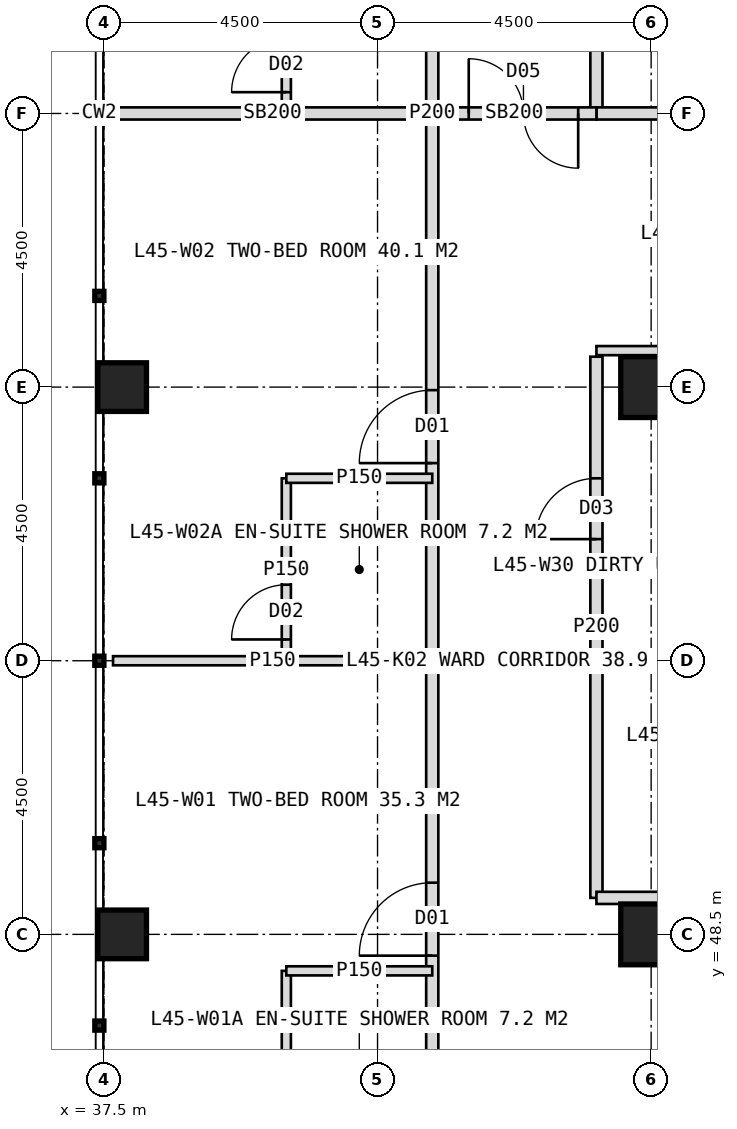
"""IFC4 building model, lengths in metres.
Left out: names, types, materials, properties, quantities, classifications, styles, units other than length and angle.
Written with IfcOpenShell. Run it as: python <this file> out.ifc"""

import sys

from ifc_helpers import new_model, si_unit, direction, frame, frame_2d, origin, origin_2d, place, context, subcontext, project, spatial, rectangle, hollow_rectangle, extrude, element, fill, save


model = new_model("IFC4")
c1 = context("Model", 3, precision=1e-05, world=origin(), true_north=direction((0.0, 1.0)))
c2 = subcontext(c1, "Body", "Model", "MODEL_VIEW")
j1 = project(units=[si_unit("LENGTHUNIT", "METRE"), si_unit("PLANEANGLEUNIT", "RADIAN")], contexts=[c1])
p1 = place(None, origin())
s1 = spatial("IfcSite", under=j1, at=p1, CompositionType="ELEMENT")
p2 = place(p1, origin())
s2 = spatial("IfcBuilding", under=s1, at=p2, CompositionType="ELEMENT")
p3 = place(p2, frame((0.0, 0.0, 189.0)))
s3 = spatial("IfcBuildingStorey", under=s2, at=p3, CompositionType="ELEMENT", Elevation=189.0)
for number, where, z_axis, x_axis in (
    (1, (46.5, 48.5, 0.0), (0.0, 0.0, 1.0), (1.0, 0.0, 0.0)),
    (2, (46.5, 57.5, 0.0), (0.0, 0.0, 1.0), (1.0, 0.0, 0.0)),
):
    element("IfcColumn", number, at=place(p3, frame(where, z_axis=z_axis, x_axis=x_axis)), inside=s3, PredefinedType="COLUMN", context=c2, shape_type="SweptSolid", body=[
        extrude(hollow_rectangle(XDim=1.0, YDim=1.0, WallThickness=0.1, at=origin_2d()), origin(), (0.0, 0.0, 1.0), 4.0),
    ])
for number, where, z_axis, x_axis in (
    (3, (37.8, 48.5, 0.0), (0.0, 0.0, 1.0), (1.0, 0.0, 0.0)),
    (4, (37.8, 57.5, 0.0), (0.0, 0.0, 1.0), (1.0, 0.0, 0.0)),
):
    element("IfcColumn", number, at=place(p3, frame(where, z_axis=z_axis, x_axis=x_axis)), inside=s3, PredefinedType="COLUMN", context=c2, shape_type="SweptSolid", body=[
        extrude(hollow_rectangle(XDim=0.8, YDim=0.8, WallThickness=0.08, at=origin_2d()), origin(), (0.0, 0.0, 1.0), 4.0),
    ])
p4 = place(p3, frame((42.9, 53.0, 0.0), z_axis=(0.0, 0.0, 1.0), x_axis=(-1.0, 0.0, 0.0)))
e5 = element("IfcWall", 5, at=p4, inside=s3, PredefinedType="PARTITIONING", context=c2, shape_type="SweptSolid", body=[
    extrude(rectangle(XDim=5.25, YDim=0.15, at=frame_2d((2.625, 0.0))), origin(), (0.0, 0.0, 1.0), 3.75),
])
p5 = place(p3, frame((42.9, 62.0, 0.0), z_axis=(0.0, 0.0, 1.0), x_axis=(-1.0, 0.0, 0.0)))
e6 = element("IfcWall", 6, at=p5, inside=s3, PredefinedType="SOLIDWALL", context=c2, shape_type="SweptSolid", body=[
    extrude(rectangle(XDim=5.25, YDim=0.2, at=frame_2d((2.625, 0.0))), origin(), (0.0, 0.0, 1.0), 2.95),
])
p6 = place(p3, frame((42.9, 44.9, 0.0), z_axis=(0.0, 0.0, 1.0), x_axis=(0.0, 1.0, 0.0)))
e7 = element("IfcWall", 7, at=p6, inside=s3, PredefinedType="PARTITIONING", context=c2, shape_type="SweptSolid", body=[
    extrude(rectangle(XDim=34.2, YDim=0.2, at=frame_2d((17.1, 0.0))), origin(), (0.0, 0.0, 1.0), 3.75),
])
p7 = place(p6, frame((3.25, 0.0, 0.0)))
e8 = element("IfcOpeningElement", 8, at=p7, cuts=e7, PredefinedType="OPENING", context=c2, shape_type="SweptSolid", body=[
    extrude(rectangle(XDim=1.2, YDim=2.2, at=frame_2d((0.6, 1.1))), frame((0.0, 0.11, 0.0), z_axis=(0.0, -1.0, 0.0), x_axis=(1.0, 0.0, 0.0)), (0.0, 0.0, 1.0), 0.22),
])
p8 = place(p6, frame((11.35, 0.0, 0.0)))
e9 = element("IfcOpeningElement", 9, at=p8, cuts=e7, PredefinedType="OPENING", context=c2, shape_type="SweptSolid", body=[
    extrude(rectangle(XDim=1.2, YDim=2.2, at=frame_2d((0.6, 1.1))), frame((0.0, 0.11, 0.0), z_axis=(0.0, -1.0, 0.0), x_axis=(1.0, 0.0, 0.0)), (0.0, 0.0, 1.0), 0.22),
])
p9 = place(p6, frame((20.35, 0.0, 0.0)))
e10 = element("IfcOpeningElement", 10, at=p9, cuts=e7, PredefinedType="OPENING", context=c2, shape_type="SweptSolid", body=[
    extrude(rectangle(XDim=1.2, YDim=2.2, at=frame_2d((0.6, 1.1))), frame((0.0, 0.11, 0.0), z_axis=(0.0, -1.0, 0.0), x_axis=(1.0, 0.0, 0.0)), (0.0, 0.0, 1.0), 0.22),
])
p10 = place(p6, frame((29.35, 0.0, 0.0)))
e11 = element("IfcOpeningElement", 11, at=p10, cuts=e7, PredefinedType="OPENING", context=c2, shape_type="SweptSolid", body=[
    extrude(rectangle(XDim=1.2, YDim=2.2, at=frame_2d((0.6, 1.1))), frame((0.0, 0.11, 0.0), z_axis=(0.0, -1.0, 0.0), x_axis=(1.0, 0.0, 0.0)), (0.0, 0.0, 1.0), 0.22),
])
p11 = place(p3, frame((40.5, 44.9, 0.0), z_axis=(0.0, 0.0, 1.0), x_axis=(0.0, 1.0, 0.0)))
e12 = element("IfcWall", 12, at=p11, inside=s3, PredefinedType="PARTITIONING", context=c2, shape_type="SweptSolid", body=[
    extrude(rectangle(XDim=3.0, YDim=0.15, at=frame_2d((1.5, 0.0))), origin(), (0.0, 0.0, 1.0), 3.75),
])
p12 = place(p11, frame((0.35, 0.0, 0.0)))
e13 = element("IfcOpeningElement", 13, at=p12, cuts=e12, PredefinedType="OPENING", context=c2, shape_type="SweptSolid", body=[
    extrude(rectangle(XDim=0.9, YDim=2.1, at=frame_2d((0.45, 1.05))), frame((0.0, 0.085, 0.0), z_axis=(0.0, -1.0, 0.0), x_axis=(1.0, 0.0, 0.0)), (0.0, 0.0, 1.0), 0.17),
])
p13 = place(p3, frame((42.9, 47.9, 0.0), z_axis=(0.0, 0.0, 1.0), x_axis=(-1.0, 0.0, 0.0)))
e14 = element("IfcWall", 14, at=p13, inside=s3, PredefinedType="PARTITIONING", context=c2, shape_type="SweptSolid", body=[
    extrude(rectangle(XDim=2.4, YDim=0.15, at=frame_2d((1.2, 0.0))), origin(), (0.0, 0.0, 1.0), 3.75),
])
p14 = place(p3, frame((40.5, 53.0, 0.0), z_axis=(0.0, 0.0, 1.0), x_axis=(0.0, 1.0, 0.0)))
e15 = element("IfcWall", 15, at=p14, inside=s3, PredefinedType="PARTITIONING", context=c2, shape_type="SweptSolid", body=[
    extrude(rectangle(XDim=3.0, YDim=0.15, at=frame_2d((1.5, 0.0))), origin(), (0.0, 0.0, 1.0), 3.75),
])
p15 = place(p14, frame((0.35, 0.0, 0.0)))
e16 = element("IfcOpeningElement", 16, at=p15, cuts=e15, PredefinedType="OPENING", context=c2, shape_type="SweptSolid", body=[
    extrude(rectangle(XDim=0.9, YDim=2.1, at=frame_2d((0.45, 1.05))), frame((0.0, 0.085, 0.0), z_axis=(0.0, -1.0, 0.0), x_axis=(1.0, 0.0, 0.0)), (0.0, 0.0, 1.0), 0.17),
])
p16 = place(p3, frame((42.9, 56.0, 0.0), z_axis=(0.0, 0.0, 1.0), x_axis=(-1.0, 0.0, 0.0)))
e17 = element("IfcWall", 17, at=p16, inside=s3, PredefinedType="PARTITIONING", context=c2, shape_type="SweptSolid", body=[
    extrude(rectangle(XDim=2.4, YDim=0.15, at=frame_2d((1.2, 0.0))), origin(), (0.0, 0.0, 1.0), 3.75),
])
p17 = place(p3, frame((40.5, 62.0, 0.0), z_axis=(0.0, 0.0, 1.0), x_axis=(0.0, 1.0, 0.0)))
e18 = element("IfcWall", 18, at=p17, inside=s3, PredefinedType="PARTITIONING", context=c2, shape_type="SweptSolid", body=[
    extrude(rectangle(XDim=3.0, YDim=0.15, at=frame_2d((1.5, 0.0))), origin(), (0.0, 0.0, 1.0), 3.75),
])
p18 = place(p17, frame((0.35, 0.0, 0.0)))
e19 = element("IfcOpeningElement", 19, at=p18, cuts=e18, PredefinedType="OPENING", context=c2, shape_type="SweptSolid", body=[
    extrude(rectangle(XDim=0.9, YDim=2.1, at=frame_2d((0.45, 1.05))), frame((0.0, 0.085, 0.0), z_axis=(0.0, -1.0, 0.0), x_axis=(1.0, 0.0, 0.0)), (0.0, 0.0, 1.0), 0.17),
])
p19 = place(p3, frame((51.0, 53.0, 0.0), z_axis=(0.0, 0.0, 1.0), x_axis=(-1.0, 0.0, 0.0)))
e20 = element("IfcWall", 20, at=p19, inside=s3, PredefinedType="PARTITIONING", context=c2, shape_type="SweptSolid", body=[
    extrude(rectangle(XDim=5.4, YDim=0.15, at=frame_2d((2.7, 0.0))), origin(), (0.0, 0.0, 1.0), 3.75),
])
p20 = place(p3, frame((45.6, 49.1, 0.0), z_axis=(0.0, 0.0, 1.0), x_axis=(0.0, 1.0, 0.0)))
e21 = element("IfcWall", 21, at=p20, inside=s3, PredefinedType="PARTITIONING", context=c2, shape_type="SweptSolid", body=[
    extrude(rectangle(XDim=8.9, YDim=0.2, at=frame_2d((4.45, 0.0))), origin(), (0.0, 0.0, 1.0), 3.75),
])
p21 = place(p20, frame((5.9, 0.0, 0.0)))
e22 = element("IfcOpeningElement", 22, at=p21, cuts=e21, PredefinedType="OPENING", context=c2, shape_type="SweptSolid", body=[
    extrude(rectangle(XDim=1.0, YDim=2.1, at=frame_2d((0.5, 1.05))), frame((0.0, 0.11, 0.0), z_axis=(0.0, -1.0, 0.0), x_axis=(1.0, 0.0, 0.0)), (0.0, 0.0, 1.0), 0.22),
])
p22 = place(p3, frame((45.6, 62.0, 0.0), z_axis=(0.0, 0.0, 1.0), x_axis=(0.0, 1.0, 0.0)))
e23 = element("IfcWall", 23, at=p22, inside=s3, PredefinedType="PARTITIONING", context=c2, shape_type="SweptSolid", body=[
    extrude(rectangle(XDim=14.4, YDim=0.2, at=frame_2d((7.2, 0.0))), origin(), (0.0, 0.0, 1.0), 3.75),
])
p23 = place(p22, frame((2.5, 0.0, 0.0)))
e24 = element("IfcOpeningElement", 24, at=p23, cuts=e23, PredefinedType="OPENING", context=c2, shape_type="SweptSolid", body=[
    extrude(rectangle(XDim=1.0, YDim=2.1, at=frame_2d((0.5, 1.05))), frame((0.0, 0.11, 0.0), z_axis=(0.0, -1.0, 0.0), x_axis=(1.0, 0.0, 0.0)), (0.0, 0.0, 1.0), 0.22),
])
p24 = place(p22, frame((7.0, 0.0, 0.0)))
e25 = element("IfcOpeningElement", 25, at=p24, cuts=e23, PredefinedType="OPENING", context=c2, shape_type="SweptSolid", body=[
    extrude(rectangle(XDim=1.0, YDim=2.1, at=frame_2d((0.5, 1.05))), frame((0.0, 0.11, 0.0), z_axis=(0.0, -1.0, 0.0), x_axis=(1.0, 0.0, 0.0)), (0.0, 0.0, 1.0), 0.22),
])
p25 = place(p22, frame((11.2, 0.0, 0.0)))
e26 = element("IfcOpeningElement", 26, at=p25, cuts=e23, PredefinedType="OPENING", context=c2, shape_type="SweptSolid", body=[
    extrude(rectangle(XDim=1.0, YDim=2.1, at=frame_2d((0.5, 1.05))), frame((0.0, 0.11, 0.0), z_axis=(0.0, -1.0, 0.0), x_axis=(1.0, 0.0, 0.0)), (0.0, 0.0, 1.0), 0.22),
])
p26 = place(p3, frame((51.0, 58.1, 0.0), z_axis=(0.0, 0.0, 1.0), x_axis=(-1.0, 0.0, 0.0)))
e27 = element("IfcWall", 27, at=p26, inside=s3, PredefinedType="PARTITIONING", context=c2, shape_type="SweptSolid", body=[
    extrude(rectangle(XDim=5.4, YDim=0.15, at=frame_2d((2.7, 0.0))), origin(), (0.0, 0.0, 1.0), 3.75),
])
p27 = place(p26, frame((0.6, 0.0, 0.0)))
e28 = element("IfcOpeningElement", 28, at=p27, cuts=e27, PredefinedType="OPENING", context=c2, shape_type="SweptSolid", body=[
    extrude(rectangle(XDim=0.9, YDim=2.1, at=frame_2d((0.45, 1.05))), frame((0.0, 0.085, 0.0), z_axis=(0.0, -1.0, 0.0), x_axis=(1.0, 0.0, 0.0)), (0.0, 0.0, 1.0), 0.17),
])
p28 = place(p3, frame((51.0, 62.0, 0.0), z_axis=(0.0, 0.0, 1.0), x_axis=(-1.0, 0.0, 0.0)))
e29 = element("IfcWall", 29, at=p28, inside=s3, PredefinedType="SOLIDWALL", context=c2, shape_type="SweptSolid", body=[
    extrude(rectangle(XDim=5.4, YDim=0.2, at=frame_2d((2.7, 0.0))), origin(), (0.0, 0.0, 1.0), 2.95),
])
p29 = place(p3, frame((57.75, 49.1, 0.0), z_axis=(0.0, 0.0, 1.0), x_axis=(-1.0, 0.0, 0.0)))
e30 = element("IfcWall", 30, at=p29, inside=s3, PredefinedType="PARTITIONING", context=c2, shape_type="SweptSolid", body=[
    extrude(rectangle(XDim=12.15, YDim=0.2, at=frame_2d((6.075, 0.0))), origin(), (0.0, 0.0, 1.0), 3.75),
])
p30 = place(p29, frame((4.3, 0.0, 0.0)))
e31 = element("IfcOpeningElement", 31, at=p30, cuts=e30, PredefinedType="OPENING", context=c2, shape_type="SweptSolid", body=[
    extrude(rectangle(XDim=1.0, YDim=2.1, at=frame_2d((0.5, 1.05))), frame((0.0, 0.11, 0.0), z_axis=(0.0, -1.0, 0.0), x_axis=(1.0, 0.0, 0.0)), (0.0, 0.0, 1.0), 0.22),
])
p31 = place(p29, frame((8.95, 0.0, 0.0)))
e32 = element("IfcOpeningElement", 32, at=p31, cuts=e30, PredefinedType="OPENING", context=c2, shape_type="SweptSolid", body=[
    extrude(rectangle(XDim=1.0, YDim=2.1, at=frame_2d((0.5, 1.05))), frame((0.0, 0.11, 0.0), z_axis=(0.0, -1.0, 0.0), x_axis=(1.0, 0.0, 0.0)), (0.0, 0.0, 1.0), 0.22),
])
p32 = place(p3, frame((45.6, 62.0, 0.0), z_axis=(0.0, 0.0, 1.0), x_axis=(-1.0, 0.0, 0.0)))
e33 = element("IfcWall", 33, at=p32, inside=s3, PredefinedType="SOLIDWALL", context=c2, shape_type="SweptSolid", body=[
    extrude(rectangle(XDim=2.7, YDim=0.2, at=frame_2d((1.35, 0.0))), origin(), (0.0, 0.0, 1.0), 2.95),
])
p33 = place(p32, frame((0.3, 0.0, 0.0)))
e34 = element("IfcOpeningElement", 34, at=p33, cuts=e33, PredefinedType="OPENING", context=c2, shape_type="SweptSolid", body=[
    extrude(rectangle(XDim=1.8, YDim=2.2, at=frame_2d((0.9, 1.1))), frame((0.0, 0.11, 0.0), z_axis=(0.0, -1.0, 0.0), x_axis=(1.0, 0.0, 0.0)), (0.0, 0.0, 1.0), 0.22),
])
p34 = place(p7, origin())
e35 = element("IfcDoor", 35, at=p34, inside=s3, OperationType="SINGLE_SWING_LEFT", PredefinedType="DOOR", context=c2, shape_type="SweptSolid", body=[
    extrude(rectangle(XDim=1.2, YDim=2.2, at=frame_2d((0.6, 1.1))), frame((0.0, 0.025, 0.0), z_axis=(0.0, -1.0, 0.0), x_axis=(1.0, 0.0, 0.0)), (0.0, 0.0, 1.0), 0.05),
])
fill(e8, e35)
p35 = place(p8, origin())
e36 = element("IfcDoor", 36, at=p35, inside=s3, OperationType="SINGLE_SWING_LEFT", PredefinedType="DOOR", context=c2, shape_type="SweptSolid", body=[
    extrude(rectangle(XDim=1.2, YDim=2.2, at=frame_2d((0.6, 1.1))), frame((0.0, 0.025, 0.0), z_axis=(0.0, -1.0, 0.0), x_axis=(1.0, 0.0, 0.0)), (0.0, 0.0, 1.0), 0.05),
])
fill(e9, e36)
p36 = place(p15, origin())
e37 = element("IfcDoor", 37, at=p36, inside=s3, OperationType="SINGLE_SWING_LEFT", PredefinedType="DOOR", context=c2, shape_type="SweptSolid", body=[
    extrude(rectangle(XDim=0.9, YDim=2.1, at=frame_2d((0.45, 1.05))), frame((0.0, 0.025, 0.0), z_axis=(0.0, -1.0, 0.0), x_axis=(1.0, 0.0, 0.0)), (0.0, 0.0, 1.0), 0.05),
])
fill(e16, e37)
p37 = place(p18, origin())
e38 = element("IfcDoor", 38, at=p37, inside=s3, OperationType="SINGLE_SWING_LEFT", PredefinedType="DOOR", context=c2, shape_type="SweptSolid", body=[
    extrude(rectangle(XDim=0.9, YDim=2.1, at=frame_2d((0.45, 1.05))), frame((0.0, 0.025, 0.0), z_axis=(0.0, -1.0, 0.0), x_axis=(1.0, 0.0, 0.0)), (0.0, 0.0, 1.0), 0.05),
])
fill(e19, e38)
p38 = place(p21, origin())
e39 = element("IfcDoor", 39, at=p38, inside=s3, OperationType="SINGLE_SWING_LEFT", PredefinedType="DOOR", context=c2, shape_type="SweptSolid", body=[
    extrude(rectangle(XDim=1.0, YDim=2.1, at=frame_2d((0.5, 1.05))), frame((0.0, 0.025, 0.0), z_axis=(0.0, -1.0, 0.0), x_axis=(1.0, 0.0, 0.0)), (0.0, 0.0, 1.0), 0.05),
])
fill(e22, e39)
p39 = place(p33, origin())
e40 = element("IfcDoor", 40, at=p39, inside=s3, OperationType="DOUBLE_DOOR_DOUBLE_SWING", PredefinedType="DOOR", context=c2, shape_type="SweptSolid", body=[
    extrude(rectangle(XDim=1.8, YDim=2.2, at=frame_2d((0.9, 1.1))), frame((0.0, 0.025, 0.0), z_axis=(0.0, -1.0, 0.0), x_axis=(1.0, 0.0, 0.0)), (0.0, 0.0, 1.0), 0.05),
])
fill(e34, e40)
save(model, sys.argv[1])
